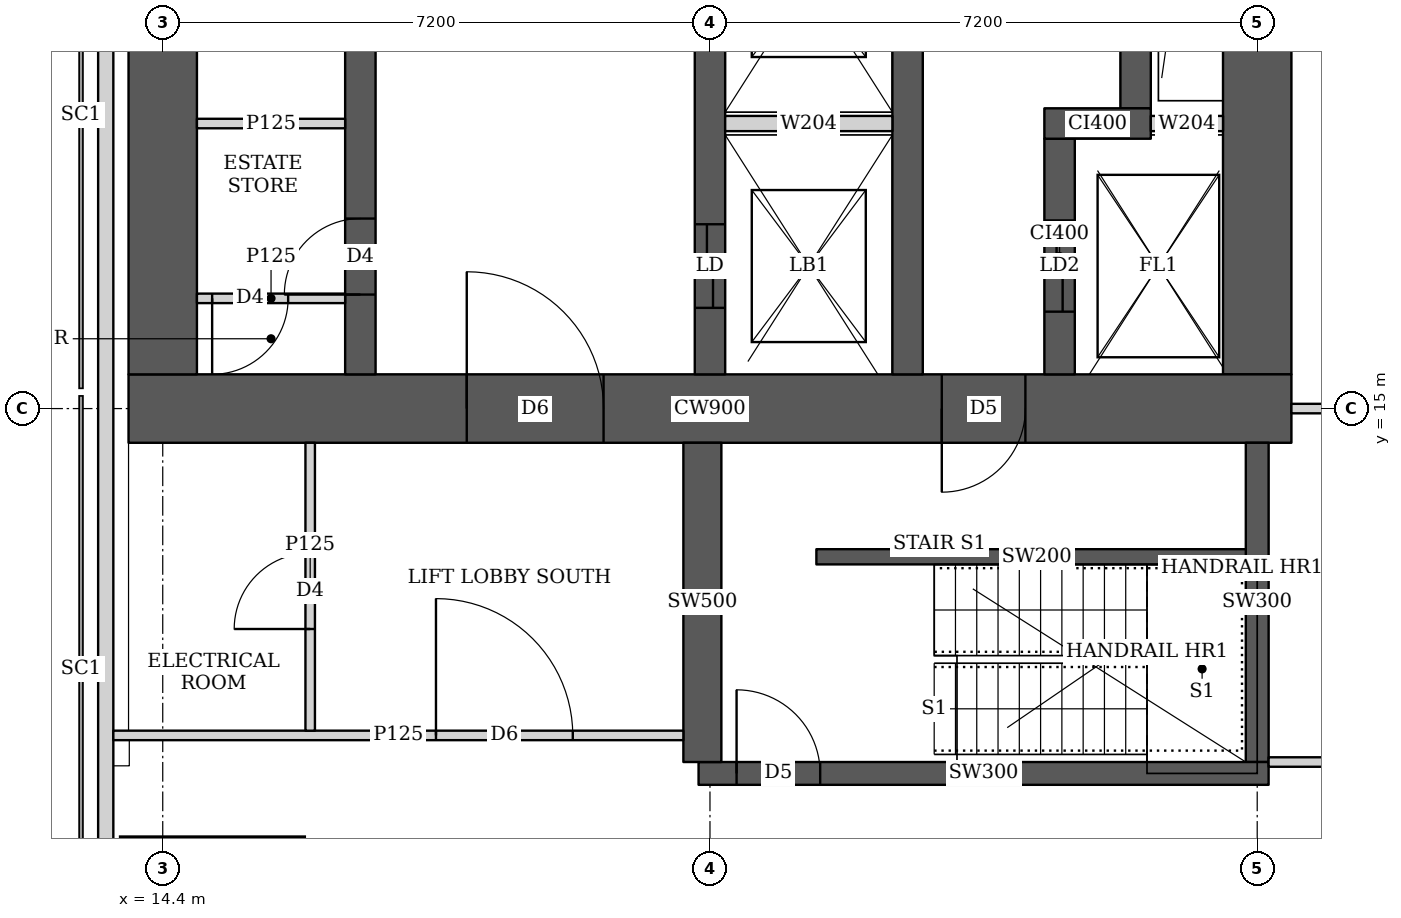
"""IFC4 building model, lengths in metres.
Left out: names, types, materials, properties, quantities, classifications, styles, units other than length and angle.
Written with IfcOpenShell. Run it as: python <this file> out.ifc"""

import sys

from ifc_helpers import new_model, si_unit, direction, frame, frame_2d, origin, origin_2d, place, context, subcontext, project, spatial, rectangle, extrude, element, fill, save


model = new_model("IFC4")
c1 = context("Model", 3, precision=1e-05, world=origin(), true_north=direction((0.0, 1.0)))
c2 = subcontext(c1, "Body", "Model", "MODEL_VIEW")
j1 = project(units=[si_unit("LENGTHUNIT", "METRE"), si_unit("PLANEANGLEUNIT", "RADIAN")], contexts=[c1])
p1 = place(None, origin())
s1 = spatial("IfcSite", under=j1, at=p1, CompositionType="ELEMENT")
p2 = place(p1, origin())
s2 = spatial("IfcBuilding", under=s1, at=p2, CompositionType="ELEMENT")
p3 = place(p2, frame((0.0, 0.0, 227.45)))
s3 = spatial("IfcBuildingStorey", under=s2, at=p3, CompositionType="ELEMENT", Elevation=227.45)
p4 = place(p3, frame((15.054, 8.154, 0.0), z_axis=(0.0, 0.0, 1.0), x_axis=(1.0, 0.0, 0.0)))
e1 = element("IfcColumn", 1, at=p4, inside=s3, PredefinedType="COLUMN", context=c2, shape_type="SweptSolid", body=[
    extrude(rectangle(XDim=2.4, YDim=2.4, at=origin_2d()), origin(), (0.0, 0.0, 1.0), 3.75),
])
p5 = place(p3, frame((13.95, 15.0, 0.0), z_axis=(0.0, 0.0, 1.0), x_axis=(1.0, 0.0, 0.0)))
e2 = element("IfcWall", 2, at=p5, inside=s3, PredefinedType="SHEAR", context=c2, shape_type="SweptSolid", body=[
    extrude(rectangle(XDim=15.3, YDim=0.9, at=frame_2d((7.65, 0.0))), origin(), (0.0, 0.0, 1.0), 3.75),
])
p6 = place(p5, frame((4.45, 0.0, 0.0)))
e3 = element("IfcOpeningElement", 3, at=p6, cuts=e2, PredefinedType="OPENING", context=c2, shape_type="SweptSolid", body=[
    extrude(rectangle(XDim=1.8, YDim=2.1, at=frame_2d((0.9, 1.05))), frame((0.0, 0.46, 0.0), z_axis=(0.0, -1.0, 0.0), x_axis=(1.0, 0.0, 0.0)), (0.0, 0.0, 1.0), 0.92),
])
p7 = place(p5, frame((10.7, 0.0, 0.0)))
e4 = element("IfcOpeningElement", 4, at=p7, cuts=e2, PredefinedType="OPENING", context=c2, shape_type="SweptSolid", body=[
    extrude(rectangle(XDim=1.1, YDim=2.1, at=frame_2d((0.55, 1.05))), frame((0.0, 0.46, 0.0), z_axis=(0.0, -1.0, 0.0), x_axis=(1.0, 0.0, 0.0)), (0.0, 0.0, 1.0), 0.92),
])
for number, where, z_axis, x_axis in (
    (5, (14.4, 15.45, 0.0), (0.0, 0.0, 1.0), (0.0, 1.0, 0.0)),
    (6, (28.8, 15.45, 0.0), (0.0, 0.0, 1.0), (0.0, 1.0, 0.0)),
):
    element("IfcWall", number, at=place(p3, frame(where, z_axis=z_axis, x_axis=x_axis)), inside=s3, PredefinedType="SHEAR", context=c2, shape_type="SweptSolid", body=[
        extrude(rectangle(XDim=14.1, YDim=0.9, at=frame_2d((7.05, 0.0))), origin(), (0.0, 0.0, 1.0), 3.75),
    ])
p8 = place(p3, frame((17.0, 15.45, 0.0), z_axis=(0.0, 0.0, 1.0), x_axis=(0.0, 1.0, 0.0)))
e7 = element("IfcWall", 7, at=p8, inside=s3, PredefinedType="SHEAR", context=c2, shape_type="SweptSolid", body=[
    extrude(rectangle(XDim=14.1, YDim=0.4, at=frame_2d((7.05, 0.0))), origin(), (0.0, 0.0, 1.0), 3.75),
])
p9 = place(p8, frame((1.05, 0.0, 0.0)))
e8 = element("IfcOpeningElement", 8, at=p9, cuts=e7, PredefinedType="OPENING", context=c2, shape_type="SweptSolid", body=[
    extrude(rectangle(XDim=1.0, YDim=2.1, at=frame_2d((0.5, 1.05))), frame((0.0, 0.21, 0.0), z_axis=(0.0, -1.0, 0.0), x_axis=(1.0, 0.0, 0.0)), (0.0, 0.0, 1.0), 0.42),
])
p10 = place(p8, frame((4.675, 0.0, 0.0)))
e9 = element("IfcOpeningElement", 9, at=p10, cuts=e7, PredefinedType="OPENING", context=c2, shape_type="SweptSolid", body=[
    extrude(rectangle(XDim=1.0, YDim=2.1, at=frame_2d((0.5, 1.05))), frame((0.0, 0.21, 0.0), z_axis=(0.0, -1.0, 0.0), x_axis=(1.0, 0.0, 0.0)), (0.0, 0.0, 1.0), 0.42),
])
p11 = place(p8, frame((8.425, 0.0, 0.0)))
e10 = element("IfcOpeningElement", 10, at=p11, cuts=e7, PredefinedType="OPENING", context=c2, shape_type="SweptSolid", body=[
    extrude(rectangle(XDim=1.0, YDim=2.1, at=frame_2d((0.5, 1.05))), frame((0.0, 0.21, 0.0), z_axis=(0.0, -1.0, 0.0), x_axis=(1.0, 0.0, 0.0)), (0.0, 0.0, 1.0), 0.42),
])
p12 = place(p8, frame((12.175, 0.0, 0.0)))
e11 = element("IfcOpeningElement", 11, at=p12, cuts=e7, PredefinedType="OPENING", context=c2, shape_type="SweptSolid", body=[
    extrude(rectangle(XDim=1.0, YDim=2.1, at=frame_2d((0.5, 1.05))), frame((0.0, 0.21, 0.0), z_axis=(0.0, -1.0, 0.0), x_axis=(1.0, 0.0, 0.0)), (0.0, 0.0, 1.0), 0.42),
])
p13 = place(p3, frame((21.6, 15.45, 0.0), z_axis=(0.0, 0.0, 1.0), x_axis=(0.0, 1.0, 0.0)))
e12 = element("IfcWall", 12, at=p13, inside=s3, PredefinedType="SHEAR", context=c2, shape_type="SweptSolid", body=[
    extrude(rectangle(XDim=14.1, YDim=0.4, at=frame_2d((7.05, 0.0))), origin(), (0.0, 0.0, 1.0), 3.75),
])
p14 = place(p13, frame((0.875, 0.0, 0.0)))
e13 = element("IfcOpeningElement", 13, at=p14, cuts=e12, PredefinedType="OPENING", context=c2, shape_type="SweptSolid", body=[
    extrude(rectangle(XDim=1.1, YDim=2.1, at=frame_2d((0.55, 1.05))), frame((0.0, 0.21, 0.0), z_axis=(0.0, -1.0, 0.0), x_axis=(1.0, 0.0, 0.0)), (0.0, 0.0, 1.0), 0.42),
])
p15 = place(p13, frame((4.625, 0.0, 0.0)))
e14 = element("IfcOpeningElement", 14, at=p15, cuts=e12, PredefinedType="OPENING", context=c2, shape_type="SweptSolid", body=[
    extrude(rectangle(XDim=1.1, YDim=2.1, at=frame_2d((0.55, 1.05))), frame((0.0, 0.21, 0.0), z_axis=(0.0, -1.0, 0.0), x_axis=(1.0, 0.0, 0.0)), (0.0, 0.0, 1.0), 0.42),
])
p16 = place(p13, frame((8.375, 0.0, 0.0)))
e15 = element("IfcOpeningElement", 15, at=p16, cuts=e12, PredefinedType="OPENING", context=c2, shape_type="SweptSolid", body=[
    extrude(rectangle(XDim=1.1, YDim=2.1, at=frame_2d((0.55, 1.05))), frame((0.0, 0.21, 0.0), z_axis=(0.0, -1.0, 0.0), x_axis=(1.0, 0.0, 0.0)), (0.0, 0.0, 1.0), 0.42),
])
p17 = place(p13, frame((12.125, 0.0, 0.0)))
e16 = element("IfcOpeningElement", 16, at=p17, cuts=e12, PredefinedType="OPENING", context=c2, shape_type="SweptSolid", body=[
    extrude(rectangle(XDim=1.1, YDim=2.1, at=frame_2d((0.55, 1.05))), frame((0.0, 0.21, 0.0), z_axis=(0.0, -1.0, 0.0), x_axis=(1.0, 0.0, 0.0)), (0.0, 0.0, 1.0), 0.42),
])
p18 = place(p3, frame((24.2, 15.45, 0.0), z_axis=(0.0, 0.0, 1.0), x_axis=(0.0, 1.0, 0.0)))
e17 = element("IfcWall", 17, at=p18, inside=s3, PredefinedType="SHEAR", context=c2, shape_type="SweptSolid", body=[
    extrude(rectangle(XDim=14.1, YDim=0.4, at=frame_2d((7.05, 0.0))), origin(), (0.0, 0.0, 1.0), 3.75),
])
p19 = place(p3, frame((26.2, 15.45, 0.0), z_axis=(0.0, 0.0, 1.0), x_axis=(0.0, 1.0, 0.0)))
e18 = element("IfcWall", 18, at=p19, inside=s3, PredefinedType="SHEAR", context=c2, shape_type="SweptSolid", body=[
    extrude(rectangle(XDim=3.1, YDim=0.4, at=frame_2d((1.55, 0.0))), origin(), (0.0, 0.0, 1.0), 3.75),
])
p20 = place(p19, frame((0.825, 0.0, 0.0)))
e19 = element("IfcOpeningElement", 19, at=p20, cuts=e18, PredefinedType="OPENING", context=c2, shape_type="SweptSolid", body=[
    extrude(rectangle(XDim=1.2, YDim=2.1, at=frame_2d((0.6, 1.05))), frame((0.0, 0.21, 0.0), z_axis=(0.0, -1.0, 0.0), x_axis=(1.0, 0.0, 0.0)), (0.0, 0.0, 1.0), 0.42),
])
p21 = place(p3, frame((26.0, 18.75, 0.0), z_axis=(0.0, 0.0, 1.0), x_axis=(1.0, 0.0, 0.0)))
e20 = element("IfcWall", 20, at=p21, inside=s3, PredefinedType="SHEAR", context=c2, shape_type="SweptSolid", body=[
    extrude(rectangle(XDim=1.4, YDim=0.4, at=frame_2d((0.7, 0.0))), origin(), (0.0, 0.0, 1.0), 3.75),
])
p22 = place(p3, frame((27.2, 18.95, 0.0), z_axis=(0.0, 0.0, 1.0), x_axis=(0.0, 1.0, 0.0)))
e21 = element("IfcWall", 21, at=p22, inside=s3, PredefinedType="SHEAR", context=c2, shape_type="SweptSolid", body=[
    extrude(rectangle(XDim=7.1, YDim=0.4, at=frame_2d((3.55, 0.0))), origin(), (0.0, 0.0, 1.0), 3.75),
])
p23 = place(p3, frame((21.45, 10.2, 0.0), z_axis=(0.0, 0.0, 1.0), x_axis=(1.0, 0.0, 0.0)))
e22 = element("IfcWall", 22, at=p23, inside=s3, PredefinedType="SHEAR", context=c2, shape_type="SweptSolid", body=[
    extrude(rectangle(XDim=7.5, YDim=0.3, at=frame_2d((3.75, 0.0))), origin(), (0.0, 0.0, 1.0), 3.75),
])
p24 = place(p23, frame((0.5, 0.0, 0.0)))
e23 = element("IfcOpeningElement", 23, at=p24, cuts=e22, PredefinedType="OPENING", context=c2, shape_type="SweptSolid", body=[
    extrude(rectangle(XDim=1.1, YDim=2.1, at=frame_2d((0.55, 1.05))), frame((0.0, 0.16, 0.0), z_axis=(0.0, -1.0, 0.0), x_axis=(1.0, 0.0, 0.0)), (0.0, 0.0, 1.0), 0.32),
])
p25 = place(p3, frame((21.5, 10.35, 0.0), z_axis=(0.0, 0.0, 1.0), x_axis=(0.0, 1.0, 0.0)))
e24 = element("IfcWall", 24, at=p25, inside=s3, PredefinedType="SHEAR", context=c2, shape_type="SweptSolid", body=[
    extrude(rectangle(XDim=4.2, YDim=0.5, at=frame_2d((2.1, 0.0))), origin(), (0.0, 0.0, 1.0), 3.75),
])
p26 = place(p3, frame((28.8, 10.35, 0.0), z_axis=(0.0, 0.0, 1.0), x_axis=(0.0, 1.0, 0.0)))
e25 = element("IfcWall", 25, at=p26, inside=s3, PredefinedType="SHEAR", context=c2, shape_type="SweptSolid", body=[
    extrude(rectangle(XDim=4.2, YDim=0.3, at=frame_2d((2.1, 0.0))), origin(), (0.0, 0.0, 1.0), 3.75),
])
p27 = place(p3, frame((13.65, 44.837, 0.0), z_axis=(0.0, 0.0, 1.0), x_axis=(0.0, -1.0, 0.0)))
e26 = element("IfcWall", 26, at=p27, inside=s3, PredefinedType="SOLIDWALL", context=c2, shape_type="SweptSolid", body=[
    extrude(rectangle(XDim=44.674, YDim=0.2, at=frame_2d((22.337, 0.0))), origin(), (0.0, 0.0, 1.0), 3.5),
])
p28 = place(p27, frame((2.614, 0.0, 0.9)))
e27 = element("IfcOpeningElement", 27, at=p28, cuts=e26, PredefinedType="OPENING", context=c2, shape_type="SweptSolid", body=[
    extrude(rectangle(XDim=2.4, YDim=1.5, at=frame_2d((1.2, 0.75))), frame((0.0, 0.11, 0.0), z_axis=(0.0, -1.0, 0.0), x_axis=(1.0, 0.0, 0.0)), (0.0, 0.0, 1.0), 0.22),
])
p29 = place(p27, frame((39.333, 0.0, 0.9)))
e28 = element("IfcOpeningElement", 28, at=p29, cuts=e26, PredefinedType="OPENING", context=c2, shape_type="SweptSolid", body=[
    extrude(rectangle(XDim=2.4, YDim=1.5, at=frame_2d((1.2, 0.75))), frame((0.0, 0.11, 0.0), z_axis=(0.0, -1.0, 0.0), x_axis=(1.0, 0.0, 0.0)), (0.0, 0.0, 1.0), 0.22),
])
p30 = place(p3, frame((13.75, 10.7, 0.0), z_axis=(0.0, 0.0, 1.0), x_axis=(1.0, 0.0, 0.0)))
e29 = element("IfcWall", 29, at=p30, inside=s3, PredefinedType="PARTITIONING", context=c2, shape_type="SweptSolid", body=[
    extrude(rectangle(XDim=7.5, YDim=0.125, at=frame_2d((3.75, 0.0))), origin(), (0.0, 0.0, 1.0), 3.5),
])
p31 = place(p30, frame((4.245, 0.0, 0.0)))
e30 = element("IfcOpeningElement", 30, at=p31, cuts=e29, PredefinedType="OPENING", context=c2, shape_type="SweptSolid", body=[
    extrude(rectangle(XDim=1.8, YDim=2.1, at=frame_2d((0.9, 1.05))), frame((0.0, 0.073, 0.0), z_axis=(0.0, -1.0, 0.0), x_axis=(1.0, 0.0, 0.0)), (0.0, 0.0, 1.0), 0.145),
])
p32 = place(p3, frame((16.34, 10.762, 0.0), z_axis=(0.0, 0.0, 1.0), x_axis=(0.0, 1.0, 0.0)))
e31 = element("IfcWall", 31, at=p32, inside=s3, PredefinedType="PARTITIONING", context=c2, shape_type="SweptSolid", body=[
    extrude(rectangle(XDim=3.788, YDim=0.125, at=frame_2d((1.894, 0.0))), origin(), (0.0, 0.0, 1.0), 3.5),
])
p33 = place(p32, frame((1.338, 0.0, 0.0)))
e32 = element("IfcOpeningElement", 32, at=p33, cuts=e31, PredefinedType="OPENING", context=c2, shape_type="SweptSolid", body=[
    extrude(rectangle(XDim=1.0, YDim=2.1, at=frame_2d((0.5, 1.05))), frame((0.0, 0.073, 0.0), z_axis=(0.0, -1.0, 0.0), x_axis=(1.0, 0.0, 0.0)), (0.0, 0.0, 1.0), 0.145),
])
p34 = place(p3, frame((28.95, 10.35, 0.0), z_axis=(0.0, 0.0, 1.0), x_axis=(1.0, 0.0, 0.0)))
e33 = element("IfcWall", 33, at=p34, inside=s3, PredefinedType="PARTITIONING", context=c2, shape_type="SweptSolid", body=[
    extrude(rectangle(XDim=8.886, YDim=0.125, at=frame_2d((4.443, 0.0))), origin(), (0.0, 0.0, 1.0), 3.5),
])
p35 = place(p3, frame((29.25, 15.0, 0.0), z_axis=(0.0, 0.0, 1.0), x_axis=(1.0, 0.0, 0.0)))
e34 = element("IfcWall", 34, at=p35, inside=s3, PredefinedType="PARTITIONING", context=c2, shape_type="SweptSolid", body=[
    extrude(rectangle(XDim=6.049, YDim=0.125, at=frame_2d((3.024, 0.0))), origin(), (0.0, 0.0, 1.0), 3.5),
])
p36 = place(p3, frame((14.85, 16.45, 0.0), z_axis=(0.0, 0.0, 1.0), x_axis=(1.0, 0.0, 0.0)))
e35 = element("IfcWall", 35, at=p36, inside=s3, PredefinedType="PARTITIONING", context=c2, shape_type="SweptSolid", body=[
    extrude(rectangle(XDim=1.95, YDim=0.125, at=frame_2d((0.975, 0.0))), origin(), (0.0, 0.0, 1.0), 3.5),
])
p37 = place(p36, frame((0.2, 0.0, 0.0)))
e36 = element("IfcOpeningElement", 36, at=p37, cuts=e35, PredefinedType="OPENING", context=c2, shape_type="SweptSolid", body=[
    extrude(rectangle(XDim=1.0, YDim=2.1, at=frame_2d((0.5, 1.05))), frame((0.0, 0.073, 0.0), z_axis=(0.0, -1.0, 0.0), x_axis=(1.0, 0.0, 0.0)), (0.0, 0.0, 1.0), 0.145),
])
p38 = place(p3, frame((14.85, 18.75, 0.0), z_axis=(0.0, 0.0, 1.0), x_axis=(1.0, 0.0, 0.0)))
e37 = element("IfcWall", 37, at=p38, inside=s3, PredefinedType="PARTITIONING", context=c2, shape_type="SweptSolid", body=[
    extrude(rectangle(XDim=1.95, YDim=0.125, at=frame_2d((0.975, 0.0))), origin(), (0.0, 0.0, 1.0), 3.5),
])
p39 = place(p3, frame((23.0, 13.05, 0.0), z_axis=(0.0, 0.0, 1.0), x_axis=(1.0, 0.0, 0.0)))
e38 = element("IfcWall", 38, at=p39, inside=s3, PredefinedType="SHEAR", context=c2, shape_type="SweptSolid", body=[
    extrude(rectangle(XDim=5.8, YDim=0.2, at=frame_2d((2.9, 0.0))), origin(), (0.0, 0.0, 1.0), 3.75),
])
p40 = place(p3, frame((21.8, 18.75, 0.0), z_axis=(0.0, 0.0, 1.0), x_axis=(1.0, 0.0, 0.0)))
e39 = element("IfcWall", 39, at=p40, inside=s3, PredefinedType="SOLIDWALL", context=c2, shape_type="SweptSolid", body=[
    extrude(rectangle(XDim=2.2, YDim=0.2, at=frame_2d((1.1, 0.0))), origin(), (0.0, 0.0, 1.0), 3.5),
])
p41 = place(p3, frame((27.4, 18.75, 0.0), z_axis=(0.0, 0.0, 1.0), x_axis=(1.0, 0.0, 0.0)))
e40 = element("IfcWall", 40, at=p41, inside=s3, PredefinedType="SOLIDWALL", context=c2, shape_type="SweptSolid", body=[
    extrude(rectangle(XDim=0.95, YDim=0.2, at=frame_2d((0.475, 0.0))), origin(), (0.0, 0.0, 1.0), 3.5),
])
p42 = place(p33, origin())
e41 = element("IfcDoor", 41, at=p42, inside=s3, OperationType="SINGLE_SWING_LEFT", PredefinedType="DOOR", context=c2, shape_type="SweptSolid", body=[
    extrude(rectangle(XDim=1.0, YDim=2.1, at=frame_2d((0.5, 1.05))), frame((0.0, 0.025, 0.0), z_axis=(0.0, -1.0, 0.0), x_axis=(1.0, 0.0, 0.0)), (0.0, 0.0, 1.0), 0.05),
])
fill(e32, e41)
p43 = place(p31, origin())
e42 = element("IfcDoor", 42, at=p43, inside=s3, OperationType="DOUBLE_DOOR_SINGLE_SWING", PredefinedType="DOOR", context=c2, shape_type="SweptSolid", body=[
    extrude(rectangle(XDim=1.8, YDim=2.1, at=frame_2d((0.9, 1.05))), frame((0.0, 0.025, 0.0), z_axis=(0.0, -1.0, 0.0), x_axis=(1.0, 0.0, 0.0)), (0.0, 0.0, 1.0), 0.05),
])
fill(e30, e42)
p44 = place(p37, origin())
e43 = element("IfcDoor", 43, at=p44, inside=s3, OperationType="SINGLE_SWING_RIGHT", PredefinedType="DOOR", context=c2, shape_type="SweptSolid", body=[
    extrude(rectangle(XDim=1.0, YDim=2.1, at=frame_2d((0.5, 1.05))), frame((0.0, 0.025, 0.0), z_axis=(0.0, -1.0, 0.0), x_axis=(1.0, 0.0, 0.0)), (0.0, 0.0, 1.0), 0.05),
])
fill(e36, e43)
p45 = place(p9, origin())
e44 = element("IfcDoor", 44, at=p45, inside=s3, OperationType="SINGLE_SWING_LEFT", PredefinedType="DOOR", context=c2, shape_type="SweptSolid", body=[
    extrude(rectangle(XDim=1.0, YDim=2.1, at=frame_2d((0.5, 1.05))), frame((0.0, 0.025, 0.0), z_axis=(0.0, -1.0, 0.0), x_axis=(1.0, 0.0, 0.0)), (0.0, 0.0, 1.0), 0.05),
])
fill(e8, e44)
p46 = place(p6, origin())
e45 = element("IfcDoor", 45, at=p46, inside=s3, OperationType="DOUBLE_DOOR_SINGLE_SWING", PredefinedType="DOOR", context=c2, shape_type="SweptSolid", body=[
    extrude(rectangle(XDim=1.8, YDim=2.1, at=frame_2d((0.9, 1.05))), frame((0.0, 0.025, 0.0), z_axis=(0.0, -1.0, 0.0), x_axis=(1.0, 0.0, 0.0)), (0.0, 0.0, 1.0), 0.05),
])
fill(e3, e45)
p47 = place(p7, origin())
e46 = element("IfcDoor", 46, at=p47, inside=s3, OperationType="SINGLE_SWING_RIGHT", PredefinedType="DOOR", context=c2, shape_type="SweptSolid", body=[
    extrude(rectangle(XDim=1.1, YDim=2.1, at=frame_2d((0.55, 1.05))), frame((0.0, 0.025, 0.0), z_axis=(0.0, -1.0, 0.0), x_axis=(1.0, 0.0, 0.0)), (0.0, 0.0, 1.0), 0.05),
])
fill(e4, e46)
p48 = place(p20, origin())
e47 = element("IfcDoor", 47, at=p48, inside=s3, OperationType="DOUBLE_DOOR_SLIDING", PredefinedType="DOOR", context=c2, shape_type="SweptSolid", body=[
    extrude(rectangle(XDim=1.2, YDim=2.1, at=frame_2d((0.6, 1.05))), frame((0.0, 0.025, 0.0), z_axis=(0.0, -1.0, 0.0), x_axis=(1.0, 0.0, 0.0)), (0.0, 0.0, 1.0), 0.05),
])
fill(e19, e47)
p49 = place(p14, origin())
e48 = element("IfcDoor", 48, at=p49, inside=s3, OperationType="DOUBLE_DOOR_SLIDING", PredefinedType="DOOR", context=c2, shape_type="SweptSolid", body=[
    extrude(rectangle(XDim=1.1, YDim=2.1, at=frame_2d((0.55, 1.05))), frame((0.0, 0.025, 0.0), z_axis=(0.0, -1.0, 0.0), x_axis=(1.0, 0.0, 0.0)), (0.0, 0.0, 1.0), 0.05),
])
fill(e13, e48)
p50 = place(p24, origin())
e49 = element("IfcDoor", 49, at=p50, inside=s3, OperationType="SINGLE_SWING_LEFT", PredefinedType="DOOR", context=c2, shape_type="SweptSolid", body=[
    extrude(rectangle(XDim=1.1, YDim=2.1, at=frame_2d((0.55, 1.05))), frame((0.0, 0.025, 0.0), z_axis=(0.0, -1.0, 0.0), x_axis=(1.0, 0.0, 0.0)), (0.0, 0.0, 1.0), 0.05),
])
fill(e23, e49)
save(model, sys.argv[1])
